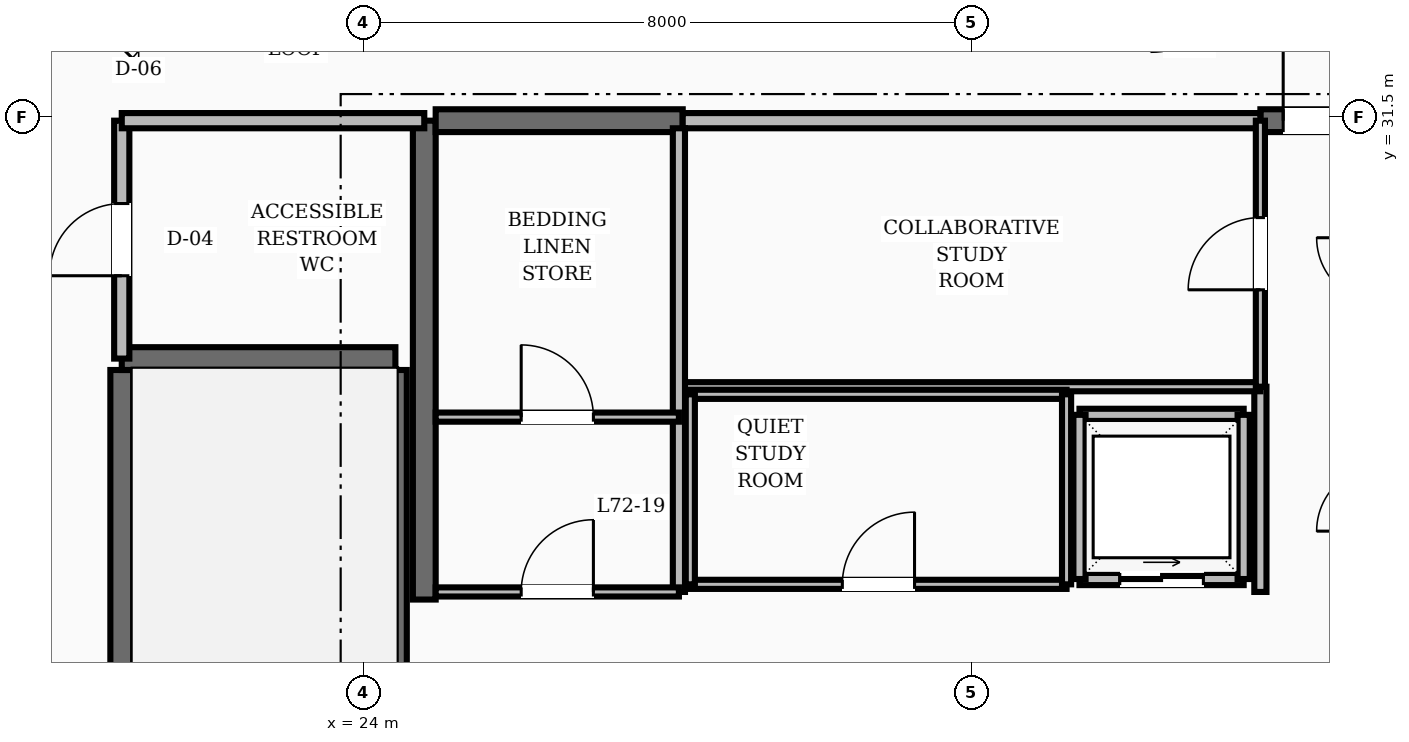
"""IFC4 building model, lengths in metres.
Left out: names, types, materials, properties, quantities, classifications, styles, units other than length and angle.
Written with IfcOpenShell. Run it as: python <this file> out.ifc"""

import sys

from ifc_helpers import new_model, si_unit, direction, frame, frame_2d, origin, place, context, subcontext, project, spatial, rectangle, extrude, element, fill, save


model = new_model("IFC4")
c1 = context("Model", 3, precision=1e-05, world=origin(), true_north=direction((0.0, 1.0)))
c2 = subcontext(c1, "Body", "Model", "MODEL_VIEW")
j1 = project(units=[si_unit("LENGTHUNIT", "METRE"), si_unit("PLANEANGLEUNIT", "RADIAN")], contexts=[c1])
p1 = place(None, origin())
s1 = spatial("IfcSite", under=j1, at=p1, CompositionType="ELEMENT")
p2 = place(p1, origin())
s2 = spatial("IfcBuilding", under=s1, at=p2, CompositionType="ELEMENT")
p3 = place(p2, frame((0.0, 0.0, 276.0)))
s3 = spatial("IfcBuildingStorey", under=s2, at=p3, CompositionType="ELEMENT", Elevation=276.0)
p4 = place(p3, frame((24.8, 25.15, 0.0), z_axis=(0.0, 0.0, 1.0), x_axis=(0.0, 1.0, 0.0)))
e1 = element("IfcWall", 1, at=p4, inside=s3, PredefinedType="SHEAR", context=c2, shape_type="SweptSolid", body=[
    extrude(rectangle(XDim=6.3, YDim=0.3, at=frame_2d((3.15, 0.0))), origin(), (0.0, 0.0, 1.0), 3.6),
])
p5 = place(p3, frame((24.95, 31.45, 0.0), z_axis=(0.0, 0.0, 1.0), x_axis=(1.0, 0.0, 0.0)))
e2 = element("IfcWall", 2, at=p5, inside=s3, PredefinedType="SHEAR", context=c2, shape_type="SweptSolid", body=[
    extrude(rectangle(XDim=3.25, YDim=0.3, at=frame_2d((1.625, 0.0))), origin(), (0.0, 0.0, 1.0), 3.6),
])
p6 = place(p3, frame((35.8, 31.45, 0.0), z_axis=(0.0, 0.0, 1.0), x_axis=(1.0, 0.0, 0.0)))
e3 = element("IfcWall", 3, at=p6, inside=s3, PredefinedType="SHEAR", context=c2, shape_type="SweptSolid", body=[
    extrude(rectangle(XDim=3.25, YDim=0.3, at=frame_2d((1.625, 0.0))), origin(), (0.0, 0.0, 1.0), 3.6),
])
p7 = place(p6, frame((0.3, 0.0, 0.0)))
e4 = element("IfcOpeningElement", 4, at=p7, cuts=e3, PredefinedType="OPENING", context=c2, shape_type="SweptSolid", body=[
    extrude(rectangle(XDim=1.1, YDim=2.1, at=frame_2d((0.55, 1.05))), frame((0.0, 0.16, 0.0), z_axis=(0.0, -1.0, 0.0), x_axis=(1.0, 0.0, 0.0)), (0.0, 0.0, 1.0), 0.32),
])
for number, where, z_axis, x_axis in (
    (5, (20.82, 19.43, 0.0), (0.0, 0.0, 1.0), (0.0, 1.0, 0.0)),
    (6, (24.42, 19.43, 0.0), (0.0, 0.0, 1.0), (0.0, 1.0, 0.0)),
):
    element("IfcWall", number, at=place(p3, frame(where, z_axis=z_axis, x_axis=x_axis)), inside=s3, PredefinedType="SHEAR", context=c2, shape_type="SweptSolid", body=[
        extrude(rectangle(XDim=8.74, YDim=0.3, at=frame_2d((4.37, 0.0))), origin(), (0.0, 0.0, 1.0), 3.6),
    ])
p8 = place(p3, frame((20.82, 28.32, 0.0), z_axis=(0.0, 0.0, 1.0), x_axis=(1.0, 0.0, 0.0)))
e7 = element("IfcWall", 7, at=p8, inside=s3, PredefinedType="SHEAR", context=c2, shape_type="SweptSolid", body=[
    extrude(rectangle(XDim=3.6, YDim=0.3, at=frame_2d((1.8, 0.0))), origin(), (0.0, 0.0, 1.0), 3.6),
])
p9 = place(p3, frame((20.82, 28.32, 0.0), z_axis=(0.0, 0.0, 1.0), x_axis=(0.0, 1.0, 0.0)))
e8 = element("IfcWall", 8, at=p9, inside=s3, PredefinedType="SOLIDWALL", context=c2, shape_type="SweptSolid", body=[
    extrude(rectangle(XDim=3.13, YDim=0.2, at=frame_2d((1.565, 0.0))), origin(), (0.0, 0.0, 1.0), 2.87),
])
p10 = place(p9, frame((1.09, 0.0, 0.0)))
e9 = element("IfcOpeningElement", 9, at=p10, cuts=e8, PredefinedType="OPENING", context=c2, shape_type="SweptSolid", body=[
    extrude(rectangle(XDim=0.95, YDim=2.1, at=frame_2d((0.475, 1.05))), frame((0.0, 0.11, 0.0), z_axis=(0.0, -1.0, 0.0), x_axis=(1.0, 0.0, 0.0)), (0.0, 0.0, 1.0), 0.22),
])
p11 = place(p3, frame((20.82, 31.45, 0.0), z_axis=(0.0, 0.0, 1.0), x_axis=(1.0, 0.0, 0.0)))
e10 = element("IfcWall", 10, at=p11, inside=s3, PredefinedType="SOLIDWALL", context=c2, shape_type="SweptSolid", body=[
    extrude(rectangle(XDim=3.98, YDim=0.2, at=frame_2d((1.99, 0.0))), origin(), (0.0, 0.0, 1.0), 2.87),
])
p12 = place(p3, frame((35.8, 25.25, 0.0), z_axis=(0.0, 0.0, 1.0), x_axis=(0.0, 1.0, 0.0)))
e11 = element("IfcWall", 11, at=p12, inside=s3, PredefinedType="SOLIDWALL", context=c2, shape_type="SweptSolid", body=[
    extrude(rectangle(XDim=2.7, YDim=0.16, at=frame_2d((1.35, 0.0))), origin(), (0.0, 0.0, 1.0), 2.87),
])
p13 = place(p3, frame((33.42, 25.42, 0.0), z_axis=(0.0, 0.0, 1.0), x_axis=(1.0, 0.0, 0.0)))
e12 = element("IfcWall", 12, at=p13, inside=s3, PredefinedType="SOLIDWALL", context=c2, shape_type="SweptSolid", body=[
    extrude(rectangle(XDim=2.16, YDim=0.16, at=frame_2d((1.08, 0.0))), origin(), (0.0, 0.0, 1.0), 2.87),
])
p14 = place(p13, frame((0.53, 0.0, 0.0)))
e13 = element("IfcOpeningElement", 13, at=p14, cuts=e12, PredefinedType="OPENING", context=c2, shape_type="SweptSolid", body=[
    extrude(rectangle(XDim=1.1, YDim=2.15, at=frame_2d((0.55, 1.075))), frame((0.0, 0.09, 0.0), z_axis=(0.0, -1.0, 0.0), x_axis=(1.0, 0.0, 0.0)), (0.0, 0.0, 1.0), 0.18),
])
for number, where, z_axis, x_axis in (
    (14, (33.42, 27.58, 0.0), (0.0, 0.0, 1.0), (1.0, 0.0, 0.0)),
    (15, (33.42, 25.42, 0.0), (0.0, 0.0, 1.0), (0.0, 1.0, 0.0)),
    (16, (35.58, 25.42, 0.0), (0.0, 0.0, 1.0), (0.0, 1.0, 0.0)),
):
    element("IfcWall", number, at=place(p3, frame(where, z_axis=z_axis, x_axis=x_axis)), inside=s3, PredefinedType="SOLIDWALL", context=c2, shape_type="SweptSolid", body=[
        extrude(rectangle(XDim=2.16, YDim=0.16, at=frame_2d((1.08, 0.0))), origin(), (0.0, 0.0, 1.0), 2.87),
    ])
p15 = place(p3, frame((28.2, 31.45, 0.0), z_axis=(0.0, 0.0, 1.0), x_axis=(1.0, 0.0, 0.0)))
e17 = element("IfcWall", 17, at=p15, inside=s3, PredefinedType="SOLIDWALL", context=c2, shape_type="SweptSolid", body=[
    extrude(rectangle(XDim=7.6, YDim=0.2, at=frame_2d((3.8, 0.0))), origin(), (0.0, 0.0, 1.0), 2.87),
])
p16 = place(p3, frame((28.2, 27.95, 0.0), z_axis=(0.0, 0.0, 1.0), x_axis=(1.0, 0.0, 0.0)))
e18 = element("IfcWall", 18, at=p16, inside=s3, PredefinedType="PARTITIONING", context=c2, shape_type="SweptSolid", body=[
    extrude(rectangle(XDim=7.6, YDim=0.12, at=frame_2d((3.8, 0.0))), origin(), (0.0, 0.0, 1.0), 2.87),
])
p17 = place(p3, frame((35.8, 27.95, 0.0), z_axis=(0.0, 0.0, 1.0), x_axis=(0.0, 1.0, 0.0)))
e19 = element("IfcWall", 19, at=p17, inside=s3, PredefinedType="PARTITIONING", context=c2, shape_type="SweptSolid", body=[
    extrude(rectangle(XDim=3.5, YDim=0.12, at=frame_2d((1.75, 0.0))), origin(), (0.0, 0.0, 1.0), 2.87),
])
p18 = place(p17, frame((1.275, 0.0, 0.0)))
e20 = element("IfcOpeningElement", 20, at=p18, cuts=e19, PredefinedType="OPENING", context=c2, shape_type="SweptSolid", body=[
    extrude(rectangle(XDim=0.95, YDim=2.1, at=frame_2d((0.475, 1.05))), frame((0.0, 0.07, 0.0), z_axis=(0.0, -1.0, 0.0), x_axis=(1.0, 0.0, 0.0)), (0.0, 0.0, 1.0), 0.14),
])
p19 = place(p3, frame((28.3, 25.35, 0.0), z_axis=(0.0, 0.0, 1.0), x_axis=(1.0, 0.0, 0.0)))
e21 = element("IfcWall", 21, at=p19, inside=s3, PredefinedType="PARTITIONING", context=c2, shape_type="SweptSolid", body=[
    extrude(rectangle(XDim=4.95, YDim=0.12, at=frame_2d((2.475, 0.0))), origin(), (0.0, 0.0, 1.0), 2.87),
])
p20 = place(p19, frame((2.0, 0.0, 0.0)))
e22 = element("IfcOpeningElement", 22, at=p20, cuts=e21, PredefinedType="OPENING", context=c2, shape_type="SweptSolid", body=[
    extrude(rectangle(XDim=0.95, YDim=2.1, at=frame_2d((0.475, 1.05))), frame((0.0, 0.07, 0.0), z_axis=(0.0, -1.0, 0.0), x_axis=(1.0, 0.0, 0.0)), (0.0, 0.0, 1.0), 0.14),
])
p21 = place(p3, frame((28.3, 27.85, 0.0), z_axis=(0.0, 0.0, 1.0), x_axis=(1.0, 0.0, 0.0)))
e23 = element("IfcWall", 23, at=p21, inside=s3, PredefinedType="PARTITIONING", context=c2, shape_type="SweptSolid", body=[
    extrude(rectangle(XDim=4.95, YDim=0.12, at=frame_2d((2.475, 0.0))), origin(), (0.0, 0.0, 1.0), 2.87),
])
for number, where, z_axis, x_axis in (
    (24, (28.3, 25.35, 0.0), (0.0, 0.0, 1.0), (0.0, 1.0, 0.0)),
    (25, (33.25, 25.35, 0.0), (0.0, 0.0, 1.0), (0.0, 1.0, 0.0)),
):
    element("IfcWall", number, at=place(p3, frame(where, z_axis=z_axis, x_axis=x_axis)), inside=s3, PredefinedType="PARTITIONING", context=c2, shape_type="SweptSolid", body=[
        extrude(rectangle(XDim=2.5, YDim=0.12, at=frame_2d((1.25, 0.0))), origin(), (0.0, 0.0, 1.0), 2.87),
    ])
p22 = place(p3, frame((28.15, 25.25, 0.0), z_axis=(0.0, 0.0, 1.0), x_axis=(0.0, 1.0, 0.0)))
e26 = element("IfcWall", 26, at=p22, inside=s3, PredefinedType="SOLIDWALL", context=c2, shape_type="SweptSolid", body=[
    extrude(rectangle(XDim=6.1, YDim=0.16, at=frame_2d((3.05, 0.0))), origin(), (0.0, 0.0, 1.0), 2.87),
])
p23 = place(p3, frame((24.95, 25.25, 0.0), z_axis=(0.0, 0.0, 1.0), x_axis=(1.0, 0.0, 0.0)))
e27 = element("IfcWall", 27, at=p23, inside=s3, PredefinedType="PARTITIONING", context=c2, shape_type="SweptSolid", body=[
    extrude(rectangle(XDim=3.2, YDim=0.12, at=frame_2d((1.6, 0.0))), origin(), (0.0, 0.0, 1.0), 2.87),
])
p24 = place(p23, frame((1.125, 0.0, 0.0)))
e28 = element("IfcOpeningElement", 28, at=p24, cuts=e27, PredefinedType="OPENING", context=c2, shape_type="SweptSolid", body=[
    extrude(rectangle(XDim=0.95, YDim=2.1, at=frame_2d((0.475, 1.05))), frame((0.0, 0.07, 0.0), z_axis=(0.0, -1.0, 0.0), x_axis=(1.0, 0.0, 0.0)), (0.0, 0.0, 1.0), 0.14),
])
p25 = place(p3, frame((24.95, 27.55, 0.0), z_axis=(0.0, 0.0, 1.0), x_axis=(1.0, 0.0, 0.0)))
e29 = element("IfcWall", 29, at=p25, inside=s3, PredefinedType="PARTITIONING", context=c2, shape_type="SweptSolid", body=[
    extrude(rectangle(XDim=3.2, YDim=0.12, at=frame_2d((1.6, 0.0))), origin(), (0.0, 0.0, 1.0), 2.87),
])
p26 = place(p25, frame((1.125, 0.0, 0.0)))
e30 = element("IfcOpeningElement", 30, at=p26, cuts=e29, PredefinedType="OPENING", context=c2, shape_type="SweptSolid", body=[
    extrude(rectangle(XDim=0.95, YDim=2.1, at=frame_2d((0.475, 1.05))), frame((0.0, 0.07, 0.0), z_axis=(0.0, -1.0, 0.0), x_axis=(1.0, 0.0, 0.0)), (0.0, 0.0, 1.0), 0.14),
])
p27 = place(p3, frame((21.635, 34.365, 0.0), z_axis=(0.0, 0.0, 1.0), x_axis=(-0.707106781187, -0.707106781187, 0.0)))
e31 = element("IfcWall", 31, at=p27, inside=s3, PredefinedType="SOLIDWALL", context=c2, shape_type="SweptSolid", body=[
    extrude(rectangle(XDim=2.916, YDim=0.16, at=frame_2d((1.458, 0.0))), origin(), (0.0, 0.0, 1.0), 2.87),
])
p28 = place(p27, frame((0.958, 0.0, 0.0)))
e32 = element("IfcOpeningElement", 32, at=p28, cuts=e31, PredefinedType="OPENING", context=c2, shape_type="SweptSolid", body=[
    extrude(rectangle(XDim=1.0, YDim=2.1, at=frame_2d((0.5, 1.05))), frame((0.0, 0.09, 0.0), z_axis=(0.0, -1.0, 0.0), x_axis=(1.0, 0.0, 0.0)), (0.0, 0.0, 1.0), 0.18),
])
p29 = place(p10, origin())
e33 = element("IfcDoor", 33, at=p29, inside=s3, OperationType="SINGLE_SWING_LEFT", PredefinedType="DOOR", context=c2, shape_type="SweptSolid", body=[
    extrude(rectangle(XDim=0.95, YDim=2.1, at=frame_2d((0.475, 1.05))), frame((0.0, 0.025, 0.0), z_axis=(0.0, -1.0, 0.0), x_axis=(1.0, 0.0, 0.0)), (0.0, 0.0, 1.0), 0.05),
])
fill(e9, e33)
p30 = place(p7, origin())
e34 = element("IfcDoor", 34, at=p30, inside=s3, OperationType="SINGLE_SWING_LEFT", PredefinedType="DOOR", context=c2, shape_type="SweptSolid", body=[
    extrude(rectangle(XDim=1.1, YDim=2.1, at=frame_2d((0.55, 1.05))), frame((0.0, 0.025, 0.0), z_axis=(0.0, -1.0, 0.0), x_axis=(1.0, 0.0, 0.0)), (0.0, 0.0, 1.0), 0.05),
])
fill(e4, e34)
p31 = place(p14, origin())
e35 = element("IfcDoor", 35, at=p31, inside=s3, OperationType="SLIDING_TO_RIGHT", PredefinedType="DOOR", context=c2, shape_type="SweptSolid", body=[
    extrude(rectangle(XDim=1.1, YDim=2.15, at=frame_2d((0.55, 1.075))), frame((0.0, 0.025, 0.0), z_axis=(0.0, -1.0, 0.0), x_axis=(1.0, 0.0, 0.0)), (0.0, 0.0, 1.0), 0.05),
])
fill(e13, e35)
p32 = place(p18, origin())
e36 = element("IfcDoor", 36, at=p32, inside=s3, OperationType="SINGLE_SWING_LEFT", PredefinedType="DOOR", context=c2, shape_type="SweptSolid", body=[
    extrude(rectangle(XDim=0.95, YDim=2.1, at=frame_2d((0.475, 1.05))), frame((0.0, 0.025, 0.0), z_axis=(0.0, -1.0, 0.0), x_axis=(1.0, 0.0, 0.0)), (0.0, 0.0, 1.0), 0.05),
])
fill(e20, e36)
p33 = place(p20, origin())
e37 = element("IfcDoor", 37, at=p33, inside=s3, OperationType="SINGLE_SWING_RIGHT", PredefinedType="DOOR", context=c2, shape_type="SweptSolid", body=[
    extrude(rectangle(XDim=0.95, YDim=2.1, at=frame_2d((0.475, 1.05))), frame((0.0, 0.025, 0.0), z_axis=(0.0, -1.0, 0.0), x_axis=(1.0, 0.0, 0.0)), (0.0, 0.0, 1.0), 0.05),
])
fill(e22, e37)
p34 = place(p24, origin())
e38 = element("IfcDoor", 38, at=p34, inside=s3, OperationType="SINGLE_SWING_RIGHT", PredefinedType="DOOR", context=c2, shape_type="SweptSolid", body=[
    extrude(rectangle(XDim=0.95, YDim=2.1, at=frame_2d((0.475, 1.05))), frame((0.0, 0.025, 0.0), z_axis=(0.0, -1.0, 0.0), x_axis=(1.0, 0.0, 0.0)), (0.0, 0.0, 1.0), 0.05),
])
fill(e28, e38)
p35 = place(p26, origin())
e39 = element("IfcDoor", 39, at=p35, inside=s3, OperationType="SINGLE_SWING_LEFT", PredefinedType="DOOR", context=c2, shape_type="SweptSolid", body=[
    extrude(rectangle(XDim=0.95, YDim=2.1, at=frame_2d((0.475, 1.05))), frame((0.0, 0.025, 0.0), z_axis=(0.0, -1.0, 0.0), x_axis=(1.0, 0.0, 0.0)), (0.0, 0.0, 1.0), 0.05),
])
fill(e30, e39)
save(model, sys.argv[1])
